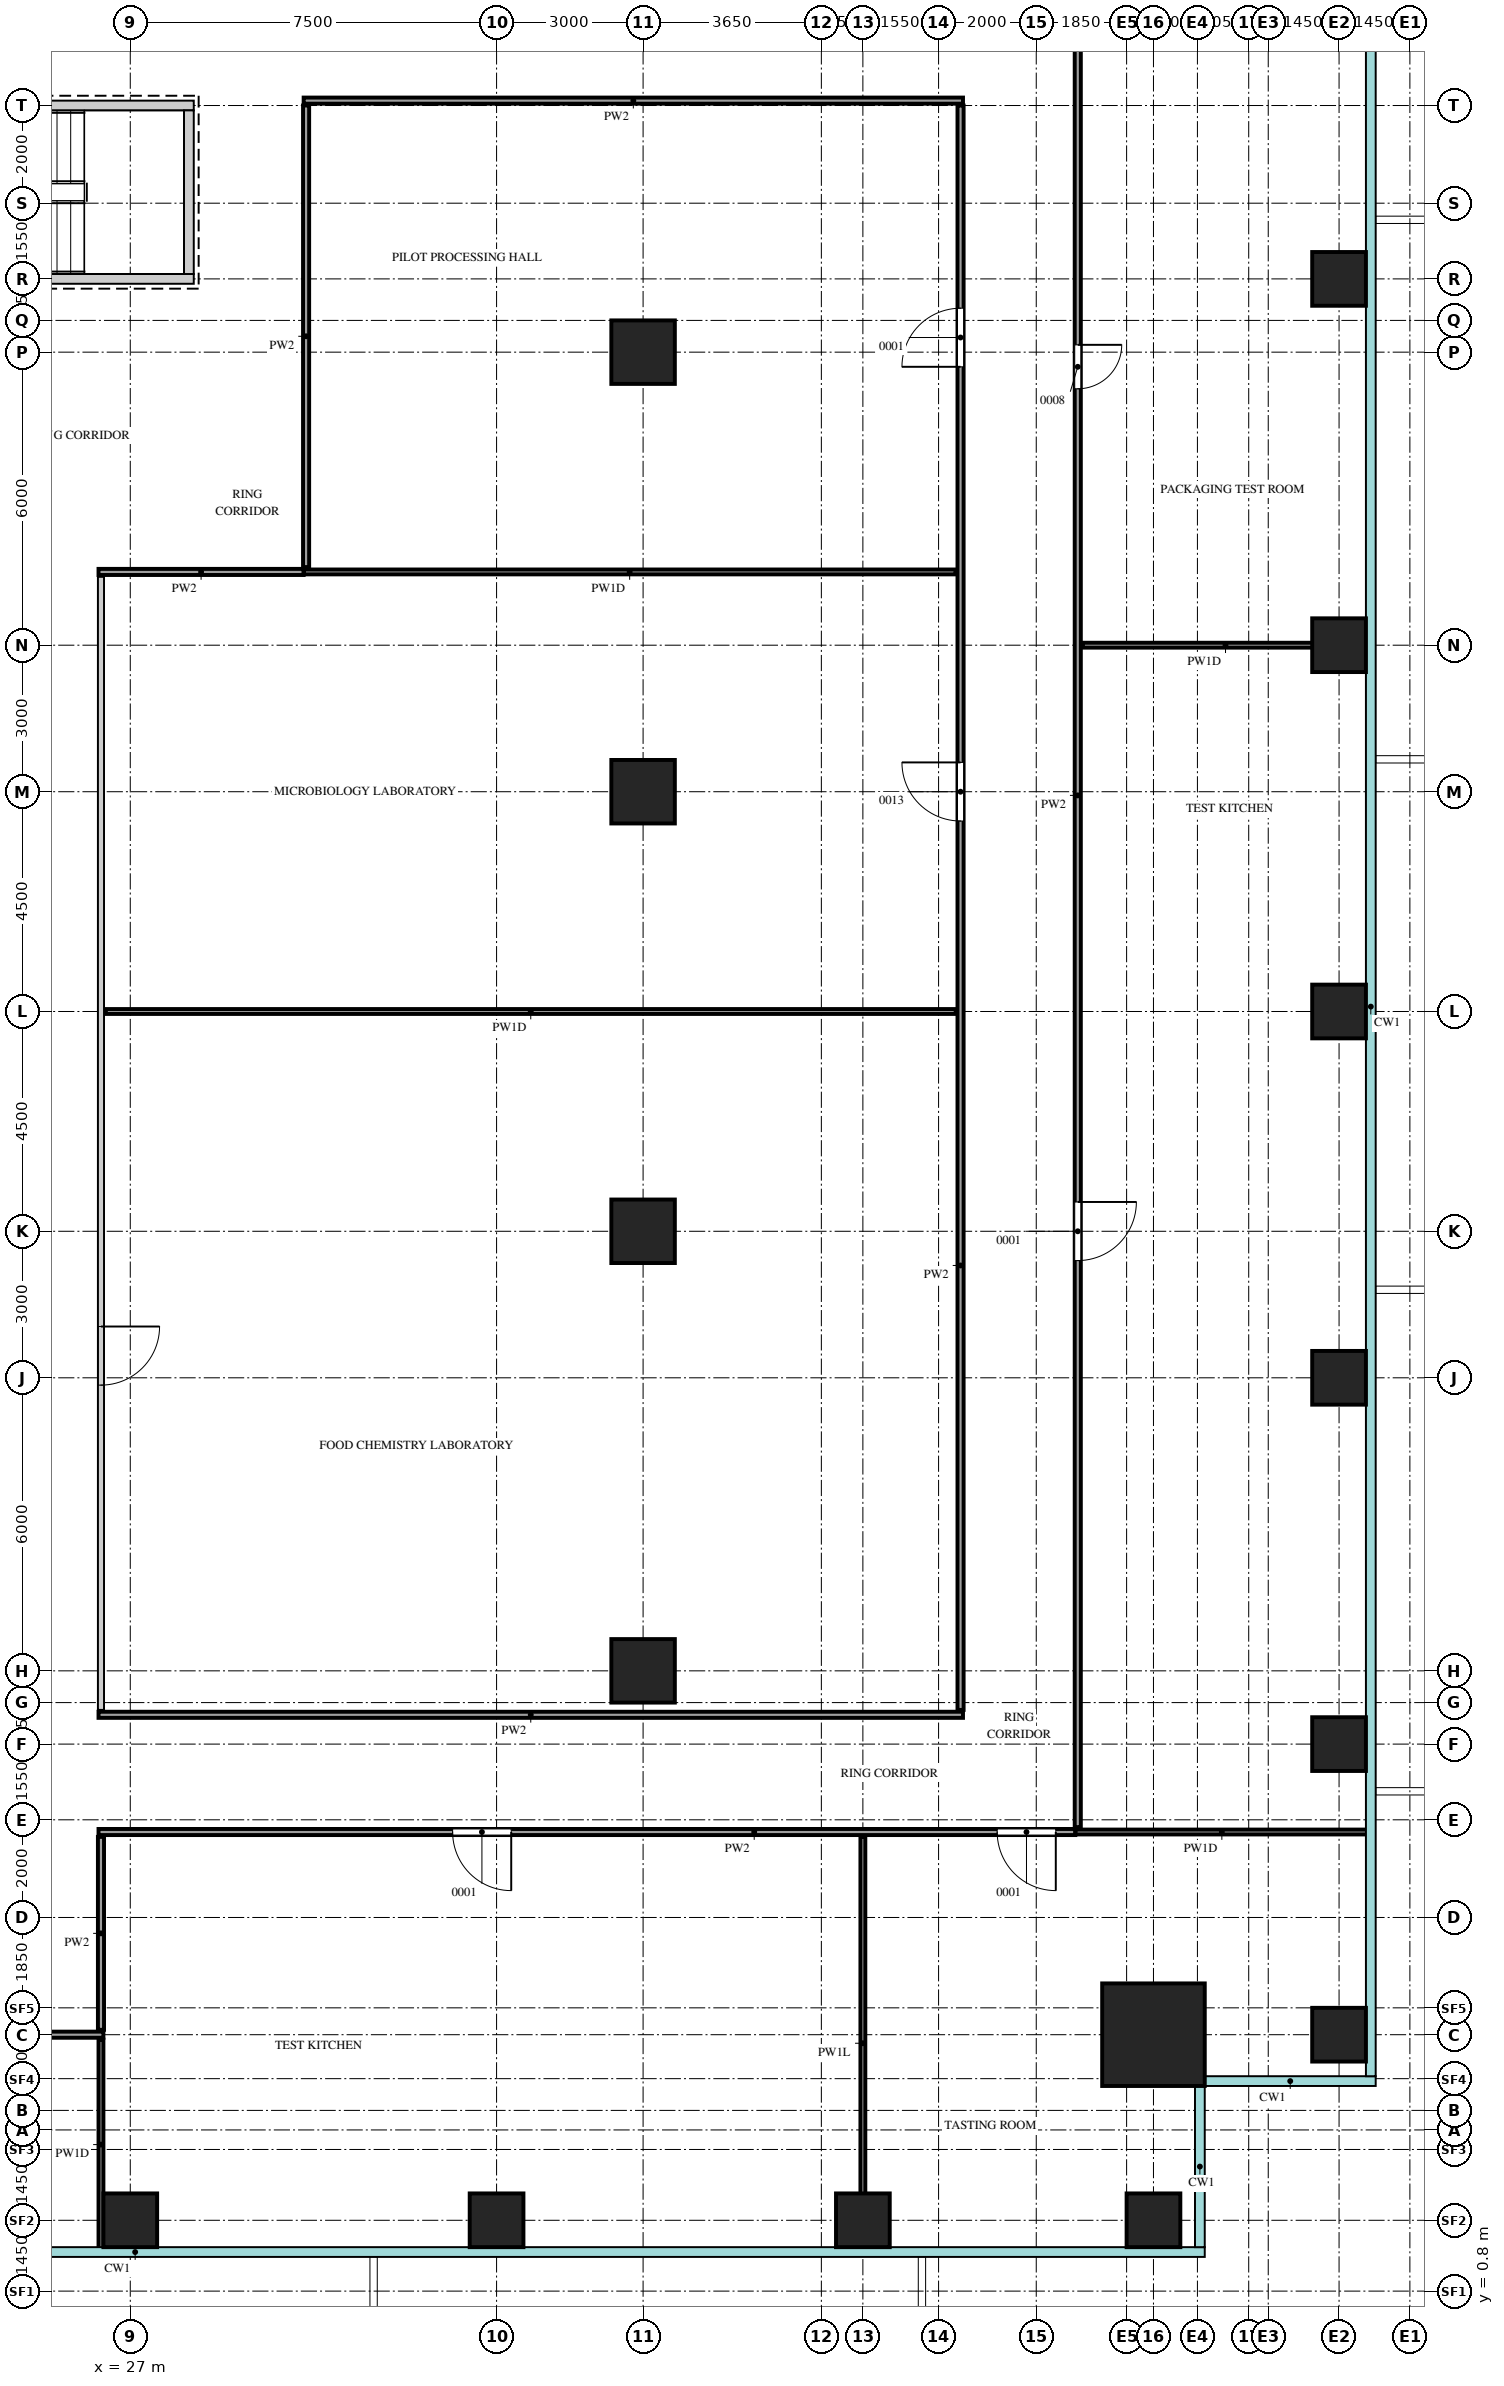
"""IFC4 building model, lengths in metres.
Left out: names, types, materials, properties, quantities, classifications, styles, units other than length and angle.
Written with IfcOpenShell. Run it as: python <this file> out.ifc"""

import sys

from ifc_helpers import new_model, si_unit, direction, frame, frame_2d, origin, origin_2d, place, context, subcontext, project, spatial, rectangle, extrude, source, transform, mapped, element, fill, save


model = new_model("IFC4")
c1 = context("Model", 3, precision=1e-05, world=origin(), true_north=direction((0.0, 1.0)))
c2 = subcontext(c1, "Body", "Model", "MODEL_VIEW")
j1 = project(units=[si_unit("LENGTHUNIT", "METRE"), si_unit("PLANEANGLEUNIT", "RADIAN")], contexts=[c1])
p1 = place(None, origin())
s1 = spatial("IfcSite", under=j1, at=p1, CompositionType="ELEMENT")
p2 = place(p1, origin())
s2 = spatial("IfcBuilding", under=s1, at=p2, CompositionType="ELEMENT")
p3 = place(p2, frame((0.0, 0.0, 119.1)))
s3 = spatial("IfcBuildingStorey", under=s2, at=p3, CompositionType="ELEMENT", Elevation=119.1)
m1 = source(origin(), c2, "Body", "SweptSolid", [
    extrude(rectangle(XDim=7.1, YDim=0.2, at=frame_2d((3.55, 0.0))), origin(), (0.0, 0.0, 1.0), 4.1),
])
p4 = place(p3, frame((21.2, 45.55, 0.0), z_axis=(0.0, 0.0, 1.0), x_axis=(1.0, 0.0, 0.0)))
e1 = element("IfcWall", 1, at=p4, inside=s3, PredefinedType="SHEAR", context=c2, shape_type="MappedRepresentation", body=[
    mapped(m1, transform((0.0, 0.0, 0.0))),
])
m2 = source(origin(), c2, "Body", "SweptSolid", [
    extrude(rectangle(XDim=1.2, YDim=2.1, at=frame_2d((0.6, 1.05))), frame((0.0, 0.11, 0.0), z_axis=(0.0, -1.0, 0.0), x_axis=(1.0, 0.0, 0.0)), (0.0, 0.0, 1.0), 0.22),
])
p5 = place(p4, frame((0.15, 0.0, 0.0)))
e2 = element("IfcOpeningElement", 2, at=p5, cuts=e1, PredefinedType="OPENING", context=c2, shape_type="MappedRepresentation", body=[
    mapped(m2, transform((0.0, 0.0, 0.0))),
])
p6 = place(p3, frame((21.2, 42.0, 0.0), z_axis=(0.0, 0.0, 1.0), x_axis=(1.0, 0.0, 0.0)))
e3 = element("IfcWall", 3, at=p6, inside=s3, PredefinedType="SHEAR", context=c2, shape_type="MappedRepresentation", body=[
    mapped(m1, transform((0.0, 0.0, 0.0))),
])
m3 = source(origin(), c2, "Body", "SweptSolid", [
    extrude(rectangle(XDim=3.35, YDim=0.2, at=frame_2d((1.675, 0.0))), origin(), (0.0, 0.0, 1.0), 4.1),
])
p7 = place(p3, frame((28.2, 42.1, 0.0), z_axis=(0.0, 0.0, 1.0), x_axis=(0.0, 1.0, 0.0)))
e4 = element("IfcWall", 4, at=p7, inside=s3, PredefinedType="SHEAR", context=c2, shape_type="MappedRepresentation", body=[
    mapped(m3, transform((0.0, 0.0, 0.0))),
])
m4 = source(origin(), c2, "Body", "SweptSolid", [
    extrude(rectangle(XDim=2.1, YDim=2.1, at=origin_2d()), origin(), (0.0, 0.0, 1.0), 4.4),
])
p8 = place(p3, frame((47.95, 6.05, 0.0), z_axis=(0.0, 0.0, 1.0), x_axis=(1.0, 0.0, 0.0)))
e5 = element("IfcColumn", 5, at=p8, inside=s3, PredefinedType="COLUMN", context=c2, shape_type="MappedRepresentation", body=[
    mapped(m4, transform((0.0, 0.0, 0.0))),
])
m5 = source(origin(), c2, "Body", "SweptSolid", [
    extrude(rectangle(XDim=1.1, YDim=1.1, at=origin_2d()), origin(), (0.0, 0.0, 1.0), 4.1),
])
for number, where, z_axis, x_axis in (
    (6, (27.0, 2.25, 0.0), (0.0, 0.0, 1.0), (1.0, 0.0, 0.0)),
    (7, (34.5, 2.25, 0.0), (0.0, 0.0, 1.0), (1.0, 0.0, 0.0)),
    (8, (42.0, 2.25, 0.0), (0.0, 0.0, 1.0), (1.0, 0.0, 0.0)),
    (9, (47.95, 2.25, 0.0), (0.0, 0.0, 1.0), (1.0, 0.0, 0.0)),
    (10, (51.75, 6.05, 0.0), (0.0, 0.0, 1.0), (1.0, 0.0, 0.0)),
    (11, (51.75, 12.0, 0.0), (0.0, 0.0, 1.0), (1.0, 0.0, 0.0)),
    (12, (51.75, 19.5, 0.0), (0.0, 0.0, 1.0), (1.0, 0.0, 0.0)),
    (13, (51.75, 27.0, 0.0), (0.0, 0.0, 1.0), (1.0, 0.0, 0.0)),
    (14, (51.75, 34.5, 0.0), (0.0, 0.0, 1.0), (1.0, 0.0, 0.0)),
    (15, (51.75, 42.0, 0.0), (0.0, 0.0, 1.0), (1.0, 0.0, 0.0)),
):
    element("IfcColumn", number, at=place(p3, frame(where, z_axis=z_axis, x_axis=x_axis)), inside=s3, PredefinedType="COLUMN", context=c2, shape_type="MappedRepresentation", body=[
        mapped(m5, transform((0.0, 0.0, 0.0))),
    ])
m6 = source(origin(), c2, "Body", "SweptSolid", [
    extrude(rectangle(XDim=1.3, YDim=1.3, at=origin_2d()), origin(), (0.0, 0.0, 1.0), 4.1),
])
for number, where, z_axis, x_axis in (
    (16, (37.5, 13.5, 0.0), (0.0, 0.0, 1.0), (1.0, 0.0, 0.0)),
    (17, (37.5, 22.5, 0.0), (0.0, 0.0, 1.0), (1.0, 0.0, 0.0)),
    (18, (37.5, 31.5, 0.0), (0.0, 0.0, 1.0), (1.0, 0.0, 0.0)),
    (19, (37.5, 40.5, 0.0), (0.0, 0.0, 1.0), (1.0, 0.0, 0.0)),
):
    element("IfcColumn", number, at=place(p3, frame(where, z_axis=z_axis, x_axis=x_axis)), inside=s3, PredefinedType="COLUMN", context=c2, shape_type="MappedRepresentation", body=[
        mapped(m6, transform((0.0, 0.0, 0.0))),
    ])
m7 = source(origin(), c2, "Body", "SweptSolid", [
    extrude(rectangle(XDim=4.3, YDim=0.1, at=frame_2d((2.15, 0.0))), origin(), (0.0, 0.0, 1.0), 4.2),
])
p9 = place(p3, frame((26.4, 1.65, 0.0), z_axis=(0.0, 0.0, 1.0), x_axis=(0.0, 1.0, 0.0)))
e20 = element("IfcWall", 20, at=p9, inside=s3, PredefinedType="PARTITIONING", context=c2, shape_type="MappedRepresentation", body=[
    mapped(m7, transform((0.0, 0.0, 0.0))),
])
m8 = source(origin(), c2, "Body", "SweptSolid", [
    extrude(rectangle(XDim=8.45, YDim=0.1, at=frame_2d((4.225, 0.0))), origin(), (0.0, 0.0, 1.0), 3.6),
])
p10 = place(p3, frame((42.0, 1.65, 0.0), z_axis=(0.0, 0.0, 1.0), x_axis=(0.0, 1.0, 0.0)))
e21 = element("IfcWall", 21, at=p10, inside=s3, PredefinedType="PARTITIONING", context=c2, shape_type="MappedRepresentation", body=[
    mapped(m8, transform((0.0, 0.0, 0.0))),
])
m9 = source(origin(), c2, "Body", "SweptSolid", [
    extrude(rectangle(XDim=22.3, YDim=0.125, at=frame_2d((11.15, 0.0))), origin(), (0.0, 0.0, 1.0), 3.55),
])
p11 = place(p3, frame((4.15, 6.05, 0.0), z_axis=(0.0, 0.0, 1.0), x_axis=(1.0, 0.0, 0.0)))
e22 = element("IfcWall", 22, at=p11, inside=s3, PredefinedType="PARTITIONING", context=c2, shape_type="MappedRepresentation", body=[
    mapped(m9, transform((0.0, 0.0, 0.0))),
])
m10 = source(origin(), c2, "Body", "SweptSolid", [
    extrude(rectangle(XDim=0.9, YDim=2.1, at=frame_2d((0.45, 1.05))), frame((0.0, 0.073, 0.0), z_axis=(0.0, -1.0, 0.0), x_axis=(1.0, 0.0, 0.0)), (0.0, 0.0, 1.0), 0.145),
])
p12 = place(p11, frame((7.25, 0.0, 0.0)))
e23 = element("IfcOpeningElement", 23, at=p12, cuts=e22, PredefinedType="OPENING", context=c2, shape_type="MappedRepresentation", body=[
    mapped(m10, transform((0.0, 0.0, 0.0))),
])
p13 = place(p11, frame((18.35, 0.0, 0.0)))
e24 = element("IfcOpeningElement", 24, at=p13, cuts=e22, PredefinedType="OPENING", context=c2, shape_type="MappedRepresentation", body=[
    mapped(m10, transform((0.0, 0.0, 0.0))),
])
m11 = source(origin(), c2, "Body", "SweptSolid", [
    extrude(rectangle(XDim=3.95, YDim=0.125, at=frame_2d((1.975, 0.0))), origin(), (0.0, 0.0, 1.0), 4.2),
])
p14 = place(p3, frame((26.4, 6.15, 0.0), z_axis=(0.0, 0.0, 1.0), x_axis=(0.0, 1.0, 0.0)))
e25 = element("IfcWall", 25, at=p14, inside=s3, PredefinedType="PARTITIONING", context=c2, shape_type="MappedRepresentation", body=[
    mapped(m11, transform((0.0, 0.0, 0.0))),
])
m12 = source(origin(), c2, "Body", "SweptSolid", [
    extrude(rectangle(XDim=20.0, YDim=0.125, at=frame_2d((10.0, 0.0))), origin(), (0.0, 0.0, 1.0), 4.2),
])
p15 = place(p3, frame((26.35, 10.2, 0.0), z_axis=(0.0, 0.0, 1.0), x_axis=(1.0, 0.0, 0.0)))
e26 = element("IfcWall", 26, at=p15, inside=s3, PredefinedType="PARTITIONING", context=c2, shape_type="MappedRepresentation", body=[
    mapped(m12, transform((0.0, 0.0, 0.0))),
])
m13 = source(origin(), c2, "Body", "SweptSolid", [
    extrude(rectangle(XDim=1.2, YDim=2.1, at=frame_2d((0.6, 1.05))), frame((0.0, 0.073, 0.0), z_axis=(0.0, -1.0, 0.0), x_axis=(1.0, 0.0, 0.0)), (0.0, 0.0, 1.0), 0.145),
])
p16 = place(p15, frame((7.25, 0.0, 0.0)))
e27 = element("IfcOpeningElement", 27, at=p16, cuts=e26, PredefinedType="OPENING", context=c2, shape_type="MappedRepresentation", body=[
    mapped(m13, transform((0.0, 0.0, 0.0))),
])
p17 = place(p15, frame((18.4, 0.0, 0.0)))
e28 = element("IfcOpeningElement", 28, at=p17, cuts=e26, PredefinedType="OPENING", context=c2, shape_type="MappedRepresentation", body=[
    mapped(m13, transform((0.0, 0.0, 0.0))),
])
m14 = source(origin(), c2, "Body", "SweptSolid", [
    extrude(rectangle(XDim=6.0, YDim=0.1, at=frame_2d((3.0, 0.0))), origin(), (0.0, 0.0, 1.0), 4.2),
])
p18 = place(p3, frame((46.35, 10.2, 0.0), z_axis=(0.0, 0.0, 1.0), x_axis=(1.0, 0.0, 0.0)))
e29 = element("IfcWall", 29, at=p18, inside=s3, PredefinedType="PARTITIONING", context=c2, shape_type="MappedRepresentation", body=[
    mapped(m14, transform((0.0, 0.0, 0.0))),
])
m15 = source(origin(), c2, "Body", "SweptSolid", [
    extrude(rectangle(XDim=37.65, YDim=0.125, at=frame_2d((18.825, 0.0))), origin(), (0.0, 0.0, 1.0), 4.2),
])
p19 = place(p3, frame((46.4, 10.3, 0.0), z_axis=(0.0, 0.0, 1.0), x_axis=(0.0, 1.0, 0.0)))
e30 = element("IfcWall", 30, at=p19, inside=s3, PredefinedType="PARTITIONING", context=c2, shape_type="MappedRepresentation", body=[
    mapped(m15, transform((0.0, 0.0, 0.0))),
])
p20 = place(p19, frame((11.6, 0.0, 0.0)))
e31 = element("IfcOpeningElement", 31, at=p20, cuts=e30, PredefinedType="OPENING", context=c2, shape_type="MappedRepresentation", body=[
    mapped(m13, transform((0.0, 0.0, 0.0))),
])
p21 = place(p19, frame((29.45, 0.0, 0.0)))
e32 = element("IfcOpeningElement", 32, at=p21, cuts=e30, PredefinedType="OPENING", context=c2, shape_type="MappedRepresentation", body=[
    mapped(m10, transform((0.0, 0.0, 0.0))),
])
m16 = source(origin(), c2, "Body", "SweptSolid", [
    extrude(rectangle(XDim=17.7, YDim=0.125, at=frame_2d((8.85, 0.0))), origin(), (0.0, 0.0, 1.0), 4.2),
])
p22 = place(p3, frame((26.35, 12.6, 0.0), z_axis=(0.0, 0.0, 1.0), x_axis=(1.0, 0.0, 0.0)))
e33 = element("IfcWall", 33, at=p22, inside=s3, PredefinedType="PARTITIONING", context=c2, shape_type="MappedRepresentation", body=[
    mapped(m16, transform((0.0, 0.0, 0.0))),
])
m17 = source(origin(), c2, "Body", "SweptSolid", [
    extrude(rectangle(XDim=23.2, YDim=0.125, at=frame_2d((11.6, 0.0))), origin(), (0.0, 0.0, 1.0), 4.2),
])
p23 = place(p3, frame((26.4, 12.7, 0.0), z_axis=(0.0, 0.0, 1.0), x_axis=(0.0, 1.0, 0.0)))
e34 = element("IfcWall", 34, at=p23, inside=s3, PredefinedType="PARTITIONING", context=c2, shape_type="MappedRepresentation", body=[
    mapped(m17, transform((0.0, 0.0, 0.0))),
])
p24 = place(p23, frame((6.65, 0.0, 0.0)))
e35 = element("IfcOpeningElement", 35, at=p24, cuts=e34, PredefinedType="OPENING", context=c2, shape_type="MappedRepresentation", body=[
    mapped(m13, transform((0.0, 0.0, 0.0))),
])
m18 = source(origin(), c2, "Body", "SweptSolid", [
    extrude(rectangle(XDim=32.85, YDim=0.125, at=frame_2d((16.425, 0.0))), origin(), (0.0, 0.0, 1.0), 4.2),
])
p25 = place(p3, frame((44.0, 12.7, 0.0), z_axis=(0.0, 0.0, 1.0), x_axis=(0.0, 1.0, 0.0)))
e36 = element("IfcWall", 36, at=p25, inside=s3, PredefinedType="PARTITIONING", context=c2, shape_type="MappedRepresentation", body=[
    mapped(m18, transform((0.0, 0.0, 0.0))),
])
p26 = place(p25, frame((18.2, 0.0, 0.0)))
e37 = element("IfcOpeningElement", 37, at=p26, cuts=e36, PredefinedType="OPENING", context=c2, shape_type="MappedRepresentation", body=[
    mapped(m13, transform((0.0, 0.0, 0.0))),
])
p27 = place(p25, frame((27.5, 0.0, 0.0)))
e38 = element("IfcOpeningElement", 38, at=p27, cuts=e36, PredefinedType="OPENING", context=c2, shape_type="MappedRepresentation", body=[
    mapped(m13, transform((0.0, 0.0, 0.0))),
])
m19 = source(origin(), c2, "Body", "SweptSolid", [
    extrude(rectangle(XDim=17.4, YDim=0.1, at=frame_2d((8.7, 0.0))), origin(), (0.0, 0.0, 1.0), 4.2),
])
p28 = place(p3, frame((26.5, 27.0, 0.0), z_axis=(0.0, 0.0, 1.0), x_axis=(1.0, 0.0, 0.0)))
e39 = element("IfcWall", 39, at=p28, inside=s3, PredefinedType="PARTITIONING", context=c2, shape_type="MappedRepresentation", body=[
    mapped(m19, transform((0.0, 0.0, 0.0))),
])
m20 = source(origin(), c2, "Body", "SweptSolid", [
    extrude(rectangle(XDim=5.85, YDim=0.1, at=frame_2d((2.925, 0.0))), origin(), (0.0, 0.0, 1.0), 4.2),
])
p29 = place(p3, frame((46.5, 34.5, 0.0), z_axis=(0.0, 0.0, 1.0), x_axis=(1.0, 0.0, 0.0)))
e40 = element("IfcWall", 40, at=p29, inside=s3, PredefinedType="PARTITIONING", context=c2, shape_type="MappedRepresentation", body=[
    mapped(m20, transform((0.0, 0.0, 0.0))),
])
m21 = source(origin(), c2, "Body", "SweptSolid", [
    extrude(rectangle(XDim=4.2, YDim=0.125, at=frame_2d((2.1, 0.0))), origin(), (0.0, 0.0, 1.0), 4.2),
])
p30 = place(p3, frame((26.35, 36.0, 0.0), z_axis=(0.0, 0.0, 1.0), x_axis=(1.0, 0.0, 0.0)))
e41 = element("IfcWall", 41, at=p30, inside=s3, PredefinedType="PARTITIONING", context=c2, shape_type="MappedRepresentation", body=[
    mapped(m21, transform((0.0, 0.0, 0.0))),
])
m22 = source(origin(), c2, "Body", "SweptSolid", [
    extrude(rectangle(XDim=13.35, YDim=0.1, at=frame_2d((6.675, 0.0))), origin(), (0.0, 0.0, 1.0), 4.2),
])
p31 = place(p3, frame((30.55, 36.0, 0.0), z_axis=(0.0, 0.0, 1.0), x_axis=(1.0, 0.0, 0.0)))
e42 = element("IfcWall", 42, at=p31, inside=s3, PredefinedType="PARTITIONING", context=c2, shape_type="MappedRepresentation", body=[
    mapped(m22, transform((0.0, 0.0, 0.0))),
])
m23 = source(origin(), c2, "Body", "SweptSolid", [
    extrude(rectangle(XDim=9.45, YDim=0.125, at=frame_2d((4.725, 0.0))), origin(), (0.0, 0.0, 1.0), 4.2),
])
p32 = place(p3, frame((30.6, 36.1, 0.0), z_axis=(0.0, 0.0, 1.0), x_axis=(0.0, 1.0, 0.0)))
e43 = element("IfcWall", 43, at=p32, inside=s3, PredefinedType="PARTITIONING", context=c2, shape_type="MappedRepresentation", body=[
    mapped(m23, transform((0.0, 0.0, 0.0))),
])
m24 = source(origin(), c2, "Body", "SweptSolid", [
    extrude(rectangle(XDim=13.5, YDim=0.125, at=frame_2d((6.75, 0.0))), origin(), (0.0, 0.0, 1.0), 4.2),
])
p33 = place(p3, frame((30.55, 45.65, 0.0), z_axis=(0.0, 0.0, 1.0), x_axis=(1.0, 0.0, 0.0)))
e44 = element("IfcWall", 44, at=p33, inside=s3, PredefinedType="PARTITIONING", context=c2, shape_type="MappedRepresentation", body=[
    mapped(m24, transform((0.0, 0.0, 0.0))),
])
m25 = source(origin(), c2, "Body", "SweptSolid", [
    extrude(rectangle(XDim=1.2, YDim=2.1, at=frame_2d((0.6, 1.05))), frame((0.0, 0.025, 0.0), z_axis=(0.0, -1.0, 0.0), x_axis=(1.0, 0.0, 0.0)), (0.0, 0.0, 1.0), 0.05),
])
p34 = place(p16, origin())
e45 = element("IfcDoor", 45, at=p34, inside=s3, OperationType="SINGLE_SWING_RIGHT", PredefinedType="DOOR", context=c2, shape_type="MappedRepresentation", body=[
    mapped(m25, transform((0.0, 0.0, 0.0))),
])
fill(e27, e45)
p35 = place(p17, origin())
e46 = element("IfcDoor", 46, at=p35, inside=s3, OperationType="SINGLE_SWING_RIGHT", PredefinedType="DOOR", context=c2, shape_type="MappedRepresentation", body=[
    mapped(m25, transform((0.0, 0.0, 0.0))),
])
fill(e28, e46)
p36 = place(p24, origin())
e47 = element("IfcDoor", 47, at=p36, inside=s3, OperationType="SINGLE_SWING_RIGHT", PredefinedType="DOOR", context=c2, shape_type="MappedRepresentation", body=[
    mapped(m25, transform((0.0, 0.0, 0.0))),
])
fill(e35, e47)
p37 = place(p26, origin())
e48 = element("IfcDoor", 48, at=p37, inside=s3, OperationType="SINGLE_SWING_LEFT", PredefinedType="DOOR", context=c2, shape_type="MappedRepresentation", body=[
    mapped(m25, transform((0.0, 0.0, 0.0))),
])
fill(e37, e48)
p38 = place(p27, origin())
e49 = element("IfcDoor", 49, at=p38, inside=s3, OperationType="SINGLE_SWING_RIGHT", PredefinedType="DOOR", context=c2, shape_type="MappedRepresentation", body=[
    mapped(m25, transform((0.0, 0.0, 0.0))),
])
fill(e38, e49)
p39 = place(p20, origin())
e50 = element("IfcDoor", 50, at=p39, inside=s3, OperationType="SINGLE_SWING_RIGHT", PredefinedType="DOOR", context=c2, shape_type="MappedRepresentation", body=[
    mapped(m25, transform((0.0, 0.0, 0.0))),
])
fill(e31, e50)
m26 = source(origin(), c2, "Body", "SweptSolid", [
    extrude(rectangle(XDim=0.9, YDim=2.1, at=frame_2d((0.45, 1.05))), frame((0.0, 0.025, 0.0), z_axis=(0.0, -1.0, 0.0), x_axis=(1.0, 0.0, 0.0)), (0.0, 0.0, 1.0), 0.05),
])
p40 = place(p21, origin())
e51 = element("IfcDoor", 51, at=p40, inside=s3, OperationType="SINGLE_SWING_RIGHT", PredefinedType="DOOR", context=c2, shape_type="MappedRepresentation", body=[
    mapped(m26, transform((0.0, 0.0, 0.0))),
])
fill(e32, e51)
save(model, sys.argv[1])
